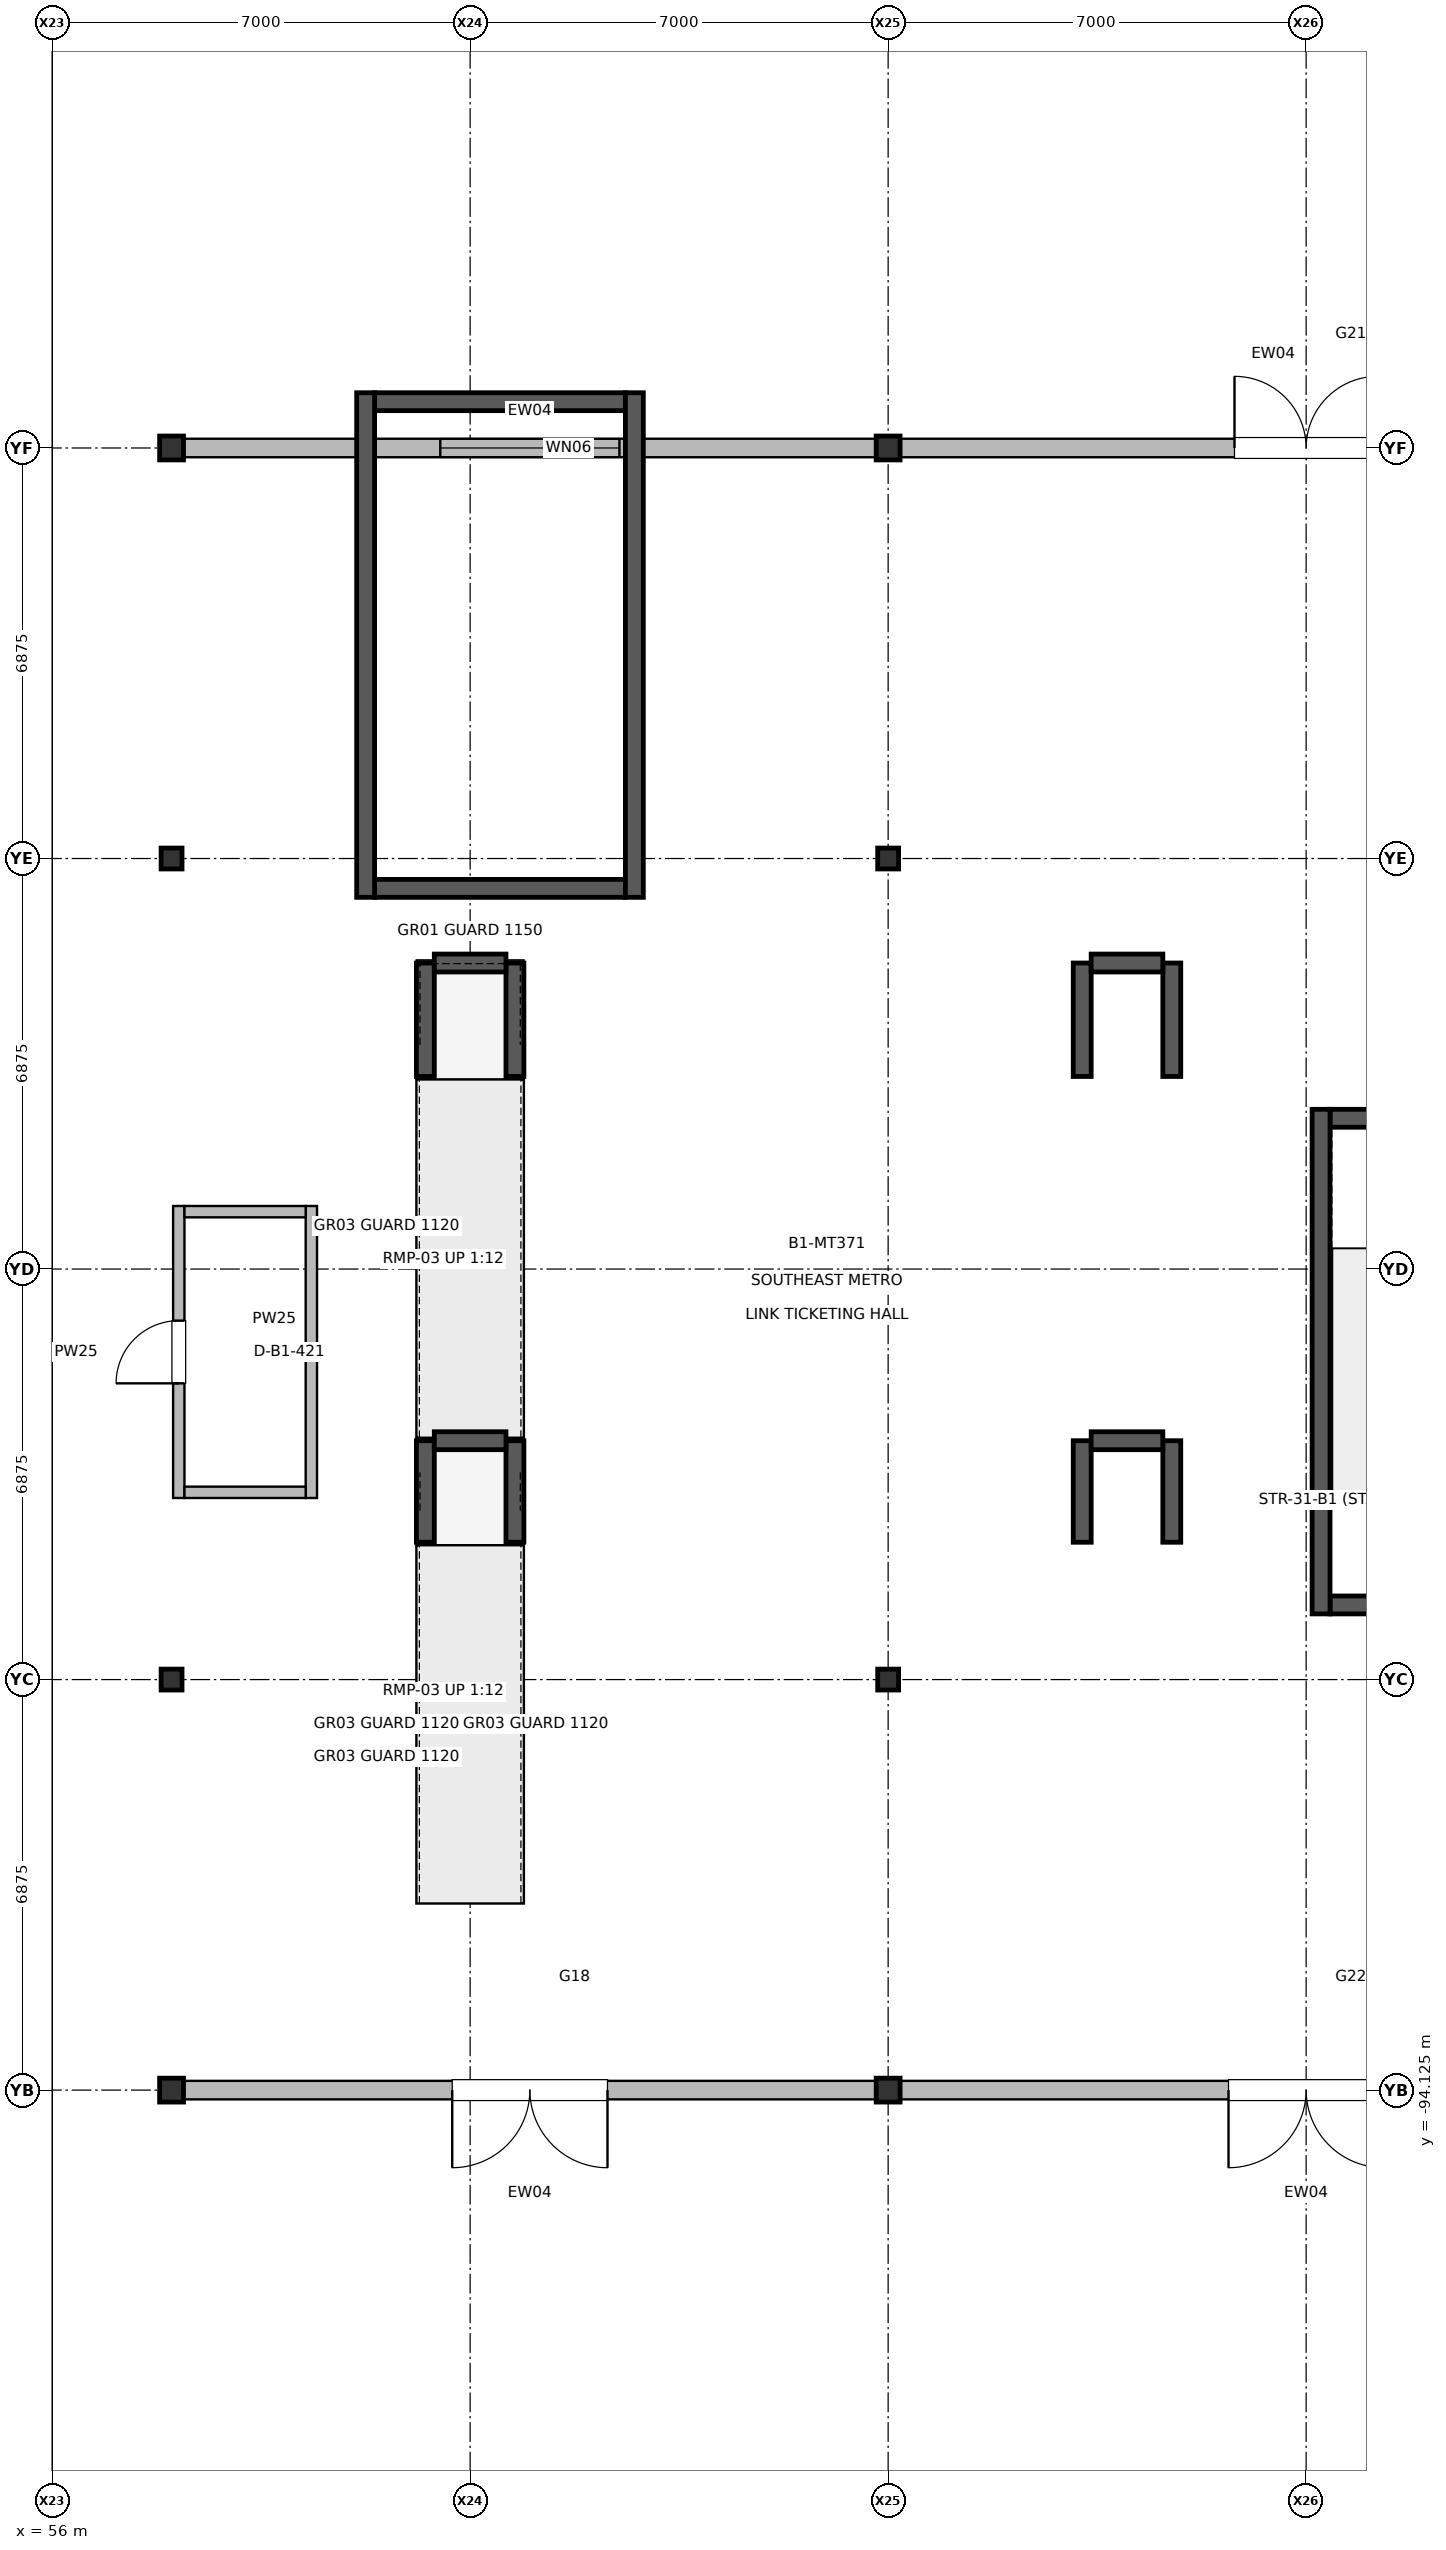
"""IFC4 building model, lengths in metres.
Left out: names, types, materials, properties, quantities, classifications, styles, units other than length and angle.
Written with IfcOpenShell. Run it as: python <this file> out.ifc"""

import sys

from ifc_helpers import new_model, si_unit, direction, frame, frame_2d, origin, origin_2d, place, context, subcontext, project, spatial, rectangle, i_section, extrude, element, fill, save


model = new_model("IFC4")
c1 = context("Model", 3, precision=1e-05, world=origin(), true_north=direction((0.0, 1.0)))
c2 = subcontext(c1, "Body", "Model", "MODEL_VIEW")
j1 = project(units=[si_unit("LENGTHUNIT", "METRE"), si_unit("PLANEANGLEUNIT", "RADIAN")], contexts=[c1])
p1 = place(None, origin())
s1 = spatial("IfcSite", under=j1, at=p1, CompositionType="ELEMENT")
p2 = place(p1, origin())
s2 = spatial("IfcBuilding", under=s1, at=p2, CompositionType="ELEMENT")
p3 = place(p2, frame((0.0, 0.0, -6.0)))
s3 = spatial("IfcBuildingStorey", under=s2, at=p3, CompositionType="ELEMENT", Elevation=-6.0)
p4 = place(p3, frame((58.0, -94.125, 0.0), z_axis=(0.0, 0.0, 1.0), x_axis=(1.0, 0.0, 0.0)))
e1 = element("IfcColumn", 1, at=p4, inside=s3, PredefinedType="COLUMN", context=c2, shape_type="SweptSolid", body=[
    extrude(i_section(OverallWidth=0.4, OverallDepth=0.4, WebThickness=0.013, FlangeThickness=0.021, at=origin_2d()), origin(), (0.0, 0.0, 1.0), 5.998),
])
for number, where, z_axis, x_axis in (
    (2, (58.0, -87.25, 0.0), (0.0, 0.0, 1.0), (1.0, 0.0, 0.0)),
    (3, (58.0, -73.5, 0.0), (0.0, 0.0, 1.0), (1.0, 0.0, 0.0)),
):
    element("IfcColumn", number, at=place(p3, frame(where, z_axis=z_axis, x_axis=x_axis)), inside=s3, PredefinedType="COLUMN", context=c2, shape_type="SweptSolid", body=[
        extrude(i_section(OverallWidth=0.35, OverallDepth=0.35, WebThickness=0.012, FlangeThickness=0.019, at=origin_2d()), origin(), (0.0, 0.0, 1.0), 5.998),
    ])
for number, where, z_axis, x_axis in (
    (4, (58.0, -66.625, 0.0), (0.0, 0.0, 1.0), (1.0, 0.0, 0.0)),
    (5, (70.0, -94.125, 0.0), (0.0, 0.0, 1.0), (1.0, 0.0, 0.0)),
):
    element("IfcColumn", number, at=place(p3, frame(where, z_axis=z_axis, x_axis=x_axis)), inside=s3, PredefinedType="COLUMN", context=c2, shape_type="SweptSolid", body=[
        extrude(i_section(OverallWidth=0.4, OverallDepth=0.4, WebThickness=0.013, FlangeThickness=0.021, at=origin_2d()), origin(), (0.0, 0.0, 1.0), 5.998),
    ])
for number, where, z_axis, x_axis in (
    (6, (70.0, -87.25, 0.0), (0.0, 0.0, 1.0), (1.0, 0.0, 0.0)),
    (7, (70.0, -73.5, 0.0), (0.0, 0.0, 1.0), (1.0, 0.0, 0.0)),
):
    element("IfcColumn", number, at=place(p3, frame(where, z_axis=z_axis, x_axis=x_axis)), inside=s3, PredefinedType="COLUMN", context=c2, shape_type="SweptSolid", body=[
        extrude(i_section(OverallWidth=0.35, OverallDepth=0.35, WebThickness=0.012, FlangeThickness=0.019, at=origin_2d()), origin(), (0.0, 0.0, 1.0), 5.998),
    ])
p5 = place(p3, frame((70.0, -66.625, 0.0), z_axis=(0.0, 0.0, 1.0), x_axis=(1.0, 0.0, 0.0)))
e8 = element("IfcColumn", 8, at=p5, inside=s3, PredefinedType="COLUMN", context=c2, shape_type="SweptSolid", body=[
    extrude(i_section(OverallWidth=0.4, OverallDepth=0.4, WebThickness=0.013, FlangeThickness=0.021, at=origin_2d()), origin(), (0.0, 0.0, 1.0), 5.998),
])
p6 = place(p3, frame((58.19, -66.625, 0.0), z_axis=(0.0, 0.0, 1.0), x_axis=(1.0, 0.0, 0.0)))
e9 = element("IfcWall", 9, at=p6, inside=s3, PredefinedType="SOLIDWALL", context=c2, shape_type="SweptSolid", body=[
    extrude(rectangle(XDim=11.62, YDim=0.31, at=frame_2d((5.81, 0.0))), origin(), (0.0, 0.0, 1.0), 4.655),
])
p7 = place(p6, frame((4.31, 0.0, 1.0)))
e10 = element("IfcOpeningElement", 10, at=p7, cuts=e9, PredefinedType="OPENING", context=c2, shape_type="SweptSolid", body=[
    extrude(rectangle(XDim=3.0, YDim=2.15, at=frame_2d((1.5, 1.075))), frame((0.0, 0.165, 0.0), z_axis=(0.0, -1.0, 0.0), x_axis=(1.0, 0.0, 0.0)), (0.0, 0.0, 1.0), 0.33),
])
p8 = place(p3, frame((69.81, -94.125, 0.0), z_axis=(0.0, 0.0, 1.0), x_axis=(-1.0, 0.0, 0.0)))
e11 = element("IfcWall", 11, at=p8, inside=s3, PredefinedType="SOLIDWALL", context=c2, shape_type="SweptSolid", body=[
    extrude(rectangle(XDim=11.62, YDim=0.31, at=frame_2d((5.81, 0.0))), origin(), (0.0, 0.0, 1.0), 3.955),
])
p9 = place(p8, frame((4.51, 0.0, 0.0)))
e12 = element("IfcOpeningElement", 12, at=p9, cuts=e11, PredefinedType="OPENING", context=c2, shape_type="SweptSolid", body=[
    extrude(rectangle(XDim=2.6, YDim=2.55, at=frame_2d((1.3, 1.275))), frame((0.0, 0.165, 0.0), z_axis=(0.0, -1.0, 0.0), x_axis=(1.0, 0.0, 0.0)), (0.0, 0.0, 1.0), 0.33),
])
p10 = place(p3, frame((70.19, -66.625, 0.0), z_axis=(0.0, 0.0, 1.0), x_axis=(1.0, 0.0, 0.0)))
e13 = element("IfcWall", 13, at=p10, inside=s3, PredefinedType="SOLIDWALL", context=c2, shape_type="SweptSolid", body=[
    extrude(rectangle(XDim=13.62, YDim=0.31, at=frame_2d((6.81, 0.0))), origin(), (0.0, 0.0, 1.0), 4.655),
])
p11 = place(p10, frame((5.61, 0.0, 0.0)))
e14 = element("IfcOpeningElement", 14, at=p11, cuts=e13, PredefinedType="OPENING", context=c2, shape_type="SweptSolid", body=[
    extrude(rectangle(XDim=2.4, YDim=2.5, at=frame_2d((1.2, 1.25))), frame((0.0, 0.165, 0.0), z_axis=(0.0, -1.0, 0.0), x_axis=(1.0, 0.0, 0.0)), (0.0, 0.0, 1.0), 0.33),
])
p12 = place(p3, frame((83.81, -94.125, 0.0), z_axis=(0.0, 0.0, 1.0), x_axis=(-1.0, 0.0, 0.0)))
e15 = element("IfcWall", 15, at=p12, inside=s3, PredefinedType="SOLIDWALL", context=c2, shape_type="SweptSolid", body=[
    extrude(rectangle(XDim=13.62, YDim=0.31, at=frame_2d((6.81, 0.0))), origin(), (0.0, 0.0, 1.0), 4.655),
])
p13 = place(p12, frame((5.51, 0.0, 0.0)))
e16 = element("IfcOpeningElement", 16, at=p13, cuts=e15, PredefinedType="OPENING", context=c2, shape_type="SweptSolid", body=[
    extrude(rectangle(XDim=2.6, YDim=2.55, at=frame_2d((1.3, 1.275))), frame((0.0, 0.165, 0.0), z_axis=(0.0, -1.0, 0.0), x_axis=(1.0, 0.0, 0.0)), (0.0, 0.0, 1.0), 0.33),
])
p14 = place(p3, frame((58.121, -84.209, 0.0), z_axis=(0.0, 0.0, 1.0), x_axis=(0.0, 1.0, 0.0)))
e17 = element("IfcWall", 17, at=p14, inside=s3, PredefinedType="PARTITIONING", context=c2, shape_type="SweptSolid", body=[
    extrude(rectangle(XDim=4.89, YDim=0.19, at=frame_2d((2.445, 0.0))), origin(), (0.0, 0.0, 1.0), 5.02),
])
p15 = place(p14, frame((1.92, 0.0, 0.0)))
e18 = element("IfcOpeningElement", 18, at=p15, cuts=e17, PredefinedType="OPENING", context=c2, shape_type="SweptSolid", body=[
    extrude(rectangle(XDim=1.05, YDim=2.25, at=frame_2d((0.525, 1.125))), frame((0.0, 0.105, 0.0), z_axis=(0.0, -1.0, 0.0), x_axis=(1.0, 0.0, 0.0)), (0.0, 0.0, 1.0), 0.21),
])
p16 = place(p3, frame((60.341, -84.209, 0.0), z_axis=(0.0, 0.0, 1.0), x_axis=(0.0, 1.0, 0.0)))
e19 = element("IfcWall", 19, at=p16, inside=s3, PredefinedType="PARTITIONING", context=c2, shape_type="SweptSolid", body=[
    extrude(rectangle(XDim=4.89, YDim=0.19, at=frame_2d((2.445, 0.0))), origin(), (0.0, 0.0, 1.0), 5.02),
])
for number, where, z_axis, x_axis in (
    (20, (58.216, -84.114, 0.0), (0.0, 0.0, 1.0), (1.0, 0.0, 0.0)),
    (21, (58.216, -79.414, 0.0), (0.0, 0.0, 1.0), (1.0, 0.0, 0.0)),
):
    element("IfcWall", number, at=place(p3, frame(where, z_axis=z_axis, x_axis=x_axis)), inside=s3, PredefinedType="PARTITIONING", context=c2, shape_type="SweptSolid", body=[
        extrude(rectangle(XDim=2.03, YDim=0.19, at=frame_2d((1.015, 0.0))), origin(), (0.0, 0.0, 1.0), 5.02),
    ])
p17 = place(p3, frame((77.4, -86.0, 0.0), z_axis=(0.0, 0.0, 1.0), x_axis=(1.0, 0.0, 0.0)))
e22 = element("IfcWall", 22, at=p17, inside=s3, PredefinedType="SHEAR", context=c2, shape_type="SweptSolid", body=[
    extrude(rectangle(XDim=4.2, YDim=0.3, at=frame_2d((2.1, 0.0))), origin(), (0.0, 0.0, 1.0), 5.78),
])
p18 = place(p17, frame((1.375, 0.0, 0.0)))
e23 = element("IfcOpeningElement", 23, at=p18, cuts=e22, PredefinedType="OPENING", context=c2, shape_type="SweptSolid", body=[
    extrude(rectangle(XDim=1.45, YDim=2.2, at=frame_2d((0.725, 1.1))), frame((0.0, 0.16, 0.0), z_axis=(0.0, -1.0, 0.0), x_axis=(1.0, 0.0, 0.0)), (0.0, 0.0, 1.0), 0.32),
])
p19 = place(p3, frame((77.4, -77.85, 0.0), z_axis=(0.0, 0.0, 1.0), x_axis=(1.0, 0.0, 0.0)))
e24 = element("IfcWall", 24, at=p19, inside=s3, PredefinedType="SHEAR", context=c2, shape_type="SweptSolid", body=[
    extrude(rectangle(XDim=4.2, YDim=0.3, at=frame_2d((2.1, 0.0))), origin(), (0.0, 0.0, 1.0), 5.78),
])
p20 = place(p3, frame((77.25, -86.15, 0.0), z_axis=(0.0, 0.0, 1.0), x_axis=(0.0, 1.0, 0.0)))
e25 = element("IfcWall", 25, at=p20, inside=s3, PredefinedType="SHEAR", context=c2, shape_type="SweptSolid", body=[
    extrude(rectangle(XDim=8.45, YDim=0.3, at=frame_2d((4.225, 0.0))), origin(), (0.0, 0.0, 1.0), 5.78),
])
for number, where, z_axis, x_axis in (
    (26, (61.4, -74.0, 0.0), (0.0, 0.0, 1.0), (1.0, 0.0, 0.0)),
    (27, (61.4, -65.85, 0.0), (0.0, 0.0, 1.0), (1.0, 0.0, 0.0)),
):
    element("IfcWall", number, at=place(p3, frame(where, z_axis=z_axis, x_axis=x_axis)), inside=s3, PredefinedType="SHEAR", context=c2, shape_type="SweptSolid", body=[
        extrude(rectangle(XDim=4.2, YDim=0.3, at=frame_2d((2.1, 0.0))), origin(), (0.0, 0.0, 1.0), 5.78),
    ])
for number, where, z_axis, x_axis in (
    (28, (61.25, -74.15, 0.0), (0.0, 0.0, 1.0), (0.0, 1.0, 0.0)),
    (29, (65.75, -74.15, 0.0), (0.0, 0.0, 1.0), (0.0, 1.0, 0.0)),
):
    element("IfcWall", number, at=place(p3, frame(where, z_axis=z_axis, x_axis=x_axis)), inside=s3, PredefinedType="SHEAR", context=c2, shape_type="SweptSolid", body=[
        extrude(rectangle(XDim=8.45, YDim=0.3, at=frame_2d((4.225, 0.0))), origin(), (0.0, 0.0, 1.0), 5.78),
    ])
for number, where, z_axis, x_axis in (
    (30, (62.25, -84.95, 0.0), (0.0, 0.0, 1.0), (0.0, 1.0, 0.0)),
    (31, (63.75, -84.95, 0.0), (0.0, 0.0, 1.0), (0.0, 1.0, 0.0)),
):
    element("IfcWall", number, at=place(p3, frame(where, z_axis=z_axis, x_axis=x_axis)), inside=s3, PredefinedType="SHEAR", context=c2, shape_type="SweptSolid", body=[
        extrude(rectangle(XDim=1.7, YDim=0.3, at=frame_2d((0.85, 0.0))), origin(), (0.0, 0.0, 1.0), 0.3),
    ])
p21 = place(p3, frame((62.4, -83.25, 0.0), z_axis=(0.0, 0.0, 1.0), x_axis=(1.0, 0.0, 0.0)))
e32 = element("IfcWall", 32, at=p21, inside=s3, PredefinedType="SHEAR", context=c2, shape_type="SweptSolid", body=[
    extrude(rectangle(XDim=1.2, YDim=0.3, at=frame_2d((0.6, 0.0))), origin(), (0.0, 0.0, 1.0), 0.3),
])
for number, where, z_axis, x_axis in (
    (33, (62.25, -77.15, 0.0), (0.0, 0.0, 1.0), (0.0, 1.0, 0.0)),
    (34, (63.75, -77.15, 0.0), (0.0, 0.0, 1.0), (0.0, 1.0, 0.0)),
):
    element("IfcWall", number, at=place(p3, frame(where, z_axis=z_axis, x_axis=x_axis)), inside=s3, PredefinedType="SHEAR", context=c2, shape_type="SweptSolid", body=[
        extrude(rectangle(XDim=1.9, YDim=0.3, at=frame_2d((0.95, 0.0))), origin(), (0.0, 0.0, 1.0), 0.8),
    ])
p22 = place(p3, frame((62.4, -75.25, 0.0), z_axis=(0.0, 0.0, 1.0), x_axis=(1.0, 0.0, 0.0)))
e35 = element("IfcWall", 35, at=p22, inside=s3, PredefinedType="SHEAR", context=c2, shape_type="SweptSolid", body=[
    extrude(rectangle(XDim=1.2, YDim=0.3, at=frame_2d((0.6, 0.0))), origin(), (0.0, 0.0, 1.0), 0.8),
])
for number, where, z_axis, x_axis in (
    (36, (73.25, -84.95, 0.0), (0.0, 0.0, 1.0), (0.0, 1.0, 0.0)),
    (37, (74.75, -84.95, 0.0), (0.0, 0.0, 1.0), (0.0, 1.0, 0.0)),
):
    element("IfcWall", number, at=place(p3, frame(where, z_axis=z_axis, x_axis=x_axis)), inside=s3, PredefinedType="SHEAR", context=c2, shape_type="SweptSolid", body=[
        extrude(rectangle(XDim=1.7, YDim=0.3, at=frame_2d((0.85, 0.0))), origin(), (0.0, 0.0, 1.0), 5.78),
    ])
p23 = place(p3, frame((73.4, -83.25, 0.0), z_axis=(0.0, 0.0, 1.0), x_axis=(1.0, 0.0, 0.0)))
e38 = element("IfcWall", 38, at=p23, inside=s3, PredefinedType="SHEAR", context=c2, shape_type="SweptSolid", body=[
    extrude(rectangle(XDim=1.2, YDim=0.3, at=frame_2d((0.6, 0.0))), origin(), (0.0, 0.0, 1.0), 5.78),
])
for number, where, z_axis, x_axis in (
    (39, (73.25, -77.15, 0.0), (0.0, 0.0, 1.0), (0.0, 1.0, 0.0)),
    (40, (74.75, -77.15, 0.0), (0.0, 0.0, 1.0), (0.0, 1.0, 0.0)),
):
    element("IfcWall", number, at=place(p3, frame(where, z_axis=z_axis, x_axis=x_axis)), inside=s3, PredefinedType="SHEAR", context=c2, shape_type="SweptSolid", body=[
        extrude(rectangle(XDim=1.9, YDim=0.3, at=frame_2d((0.95, 0.0))), origin(), (0.0, 0.0, 1.0), 5.78),
    ])
p24 = place(p3, frame((73.4, -75.25, 0.0), z_axis=(0.0, 0.0, 1.0), x_axis=(1.0, 0.0, 0.0)))
e41 = element("IfcWall", 41, at=p24, inside=s3, PredefinedType="SHEAR", context=c2, shape_type="SweptSolid", body=[
    extrude(rectangle(XDim=1.2, YDim=0.3, at=frame_2d((0.6, 0.0))), origin(), (0.0, 0.0, 1.0), 5.78),
])
p25 = place(p7, origin())
e42 = element("IfcWindow", 42, at=p25, inside=s3, PartitioningType="SINGLE_PANEL", PredefinedType="WINDOW", context=c2, shape_type="SweptSolid", body=[
    extrude(rectangle(XDim=3.0, YDim=2.15, at=frame_2d((1.5, 1.075))), frame((0.0, 0.03, 0.0), z_axis=(0.0, -1.0, 0.0), x_axis=(1.0, 0.0, 0.0)), (0.0, 0.0, 1.0), 0.06),
])
fill(e10, e42)
p26 = place(p9, origin())
e43 = element("IfcDoor", 43, at=p26, inside=s3, OperationType="DOUBLE_DOOR_SINGLE_SWING", PredefinedType="DOOR", context=c2, shape_type="SweptSolid", body=[
    extrude(rectangle(XDim=2.6, YDim=2.55, at=frame_2d((1.3, 1.275))), frame((0.0, 0.025, 0.0), z_axis=(0.0, -1.0, 0.0), x_axis=(1.0, 0.0, 0.0)), (0.0, 0.0, 1.0), 0.05),
])
fill(e12, e43)
p27 = place(p11, origin())
e44 = element("IfcDoor", 44, at=p27, inside=s3, OperationType="DOUBLE_DOOR_SINGLE_SWING", PredefinedType="DOOR", context=c2, shape_type="SweptSolid", body=[
    extrude(rectangle(XDim=2.4, YDim=2.5, at=frame_2d((1.2, 1.25))), frame((0.0, 0.025, 0.0), z_axis=(0.0, -1.0, 0.0), x_axis=(1.0, 0.0, 0.0)), (0.0, 0.0, 1.0), 0.05),
])
fill(e14, e44)
p28 = place(p13, origin())
e45 = element("IfcDoor", 45, at=p28, inside=s3, OperationType="DOUBLE_DOOR_SINGLE_SWING", PredefinedType="DOOR", context=c2, shape_type="SweptSolid", body=[
    extrude(rectangle(XDim=2.6, YDim=2.55, at=frame_2d((1.3, 1.275))), frame((0.0, 0.025, 0.0), z_axis=(0.0, -1.0, 0.0), x_axis=(1.0, 0.0, 0.0)), (0.0, 0.0, 1.0), 0.05),
])
fill(e16, e45)
p29 = place(p15, origin())
e46 = element("IfcDoor", 46, at=p29, inside=s3, OperationType="SINGLE_SWING_LEFT", PredefinedType="DOOR", context=c2, shape_type="SweptSolid", body=[
    extrude(rectangle(XDim=1.05, YDim=2.25, at=frame_2d((0.525, 1.125))), frame((0.0, 0.025, 0.0), z_axis=(0.0, -1.0, 0.0), x_axis=(1.0, 0.0, 0.0)), (0.0, 0.0, 1.0), 0.05),
])
fill(e18, e46)
save(model, sys.argv[1])
